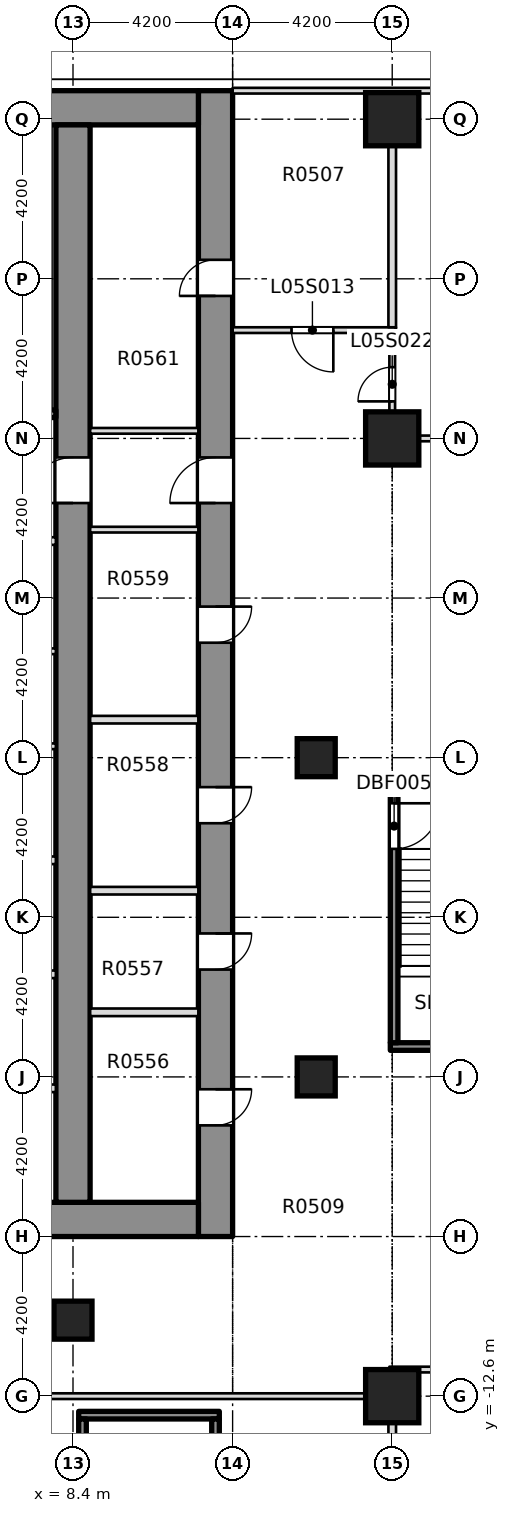
"""IFC4 building model, lengths in metres.
Left out: names, types, materials, properties, quantities, classifications, styles, units other than length and angle.
Written with IfcOpenShell. Run it as: python <this file> out.ifc"""

import sys

from ifc_helpers import new_model, si_unit, direction, frame, frame_2d, origin, origin_2d, place, context, subcontext, project, spatial, rectangle, extrude, element, fill, save


model = new_model("IFC4")
c1 = context("Model", 3, precision=1e-05, world=origin(), true_north=direction((0.0, 1.0)))
c2 = subcontext(c1, "Body", "Model", "MODEL_VIEW")
j1 = project(units=[si_unit("LENGTHUNIT", "METRE"), si_unit("PLANEANGLEUNIT", "RADIAN")], contexts=[c1])
p1 = place(None, origin())
s1 = spatial("IfcSite", under=j1, at=p1, CompositionType="ELEMENT")
p2 = place(p1, origin())
s2 = spatial("IfcBuilding", under=s1, at=p2, CompositionType="ELEMENT")
p3 = place(p2, frame((0.0, 0.0, 30.0)))
s3 = spatial("IfcBuildingStorey", under=s2, at=p3, CompositionType="ELEMENT", Elevation=30.0)
p4 = place(p3, frame((12.15, -8.4, -0.4), z_axis=(0.0, 0.0, 1.0), x_axis=(0.0, 1.0, 0.0)))
e1 = element("IfcWall", 1, at=p4, inside=s3, PredefinedType="SHEAR", context=c2, shape_type="SweptSolid", body=[
    extrude(rectangle(XDim=30.15, YDim=0.9, at=frame_2d((15.075, 0.0))), origin(), (0.0, 0.0, 1.0), 4.58),
])
p5 = place(p4, frame((2.925, 0.0, 0.4)))
e2 = element("IfcOpeningElement", 2, at=p5, cuts=e1, PredefinedType="OPENING", context=c2, shape_type="SweptSolid", body=[
    extrude(rectangle(XDim=0.95, YDim=2.1, at=frame_2d((0.475, 1.05))), frame((0.0, 0.46, 0.0), z_axis=(0.0, -1.0, 0.0), x_axis=(1.0, 0.0, 0.0)), (0.0, 0.0, 1.0), 0.92),
])
p6 = place(p4, frame((7.025, 0.0, 0.4)))
e3 = element("IfcOpeningElement", 3, at=p6, cuts=e1, PredefinedType="OPENING", context=c2, shape_type="SweptSolid", body=[
    extrude(rectangle(XDim=0.95, YDim=2.1, at=frame_2d((0.475, 1.05))), frame((0.0, 0.46, 0.0), z_axis=(0.0, -1.0, 0.0), x_axis=(1.0, 0.0, 0.0)), (0.0, 0.0, 1.0), 0.92),
])
p7 = place(p4, frame((10.875, 0.0, 0.4)))
e4 = element("IfcOpeningElement", 4, at=p7, cuts=e1, PredefinedType="OPENING", context=c2, shape_type="SweptSolid", body=[
    extrude(rectangle(XDim=0.95, YDim=2.1, at=frame_2d((0.475, 1.05))), frame((0.0, 0.46, 0.0), z_axis=(0.0, -1.0, 0.0), x_axis=(1.0, 0.0, 0.0)), (0.0, 0.0, 1.0), 0.92),
])
p8 = place(p4, frame((15.625, 0.0, 0.4)))
e5 = element("IfcOpeningElement", 5, at=p8, cuts=e1, PredefinedType="OPENING", context=c2, shape_type="SweptSolid", body=[
    extrude(rectangle(XDim=0.95, YDim=2.1, at=frame_2d((0.475, 1.05))), frame((0.0, 0.46, 0.0), z_axis=(0.0, -1.0, 0.0), x_axis=(1.0, 0.0, 0.0)), (0.0, 0.0, 1.0), 0.92),
])
p9 = place(p4, frame((24.75, 0.0, 0.4)))
e6 = element("IfcOpeningElement", 6, at=p9, cuts=e1, PredefinedType="OPENING", context=c2, shape_type="SweptSolid", body=[
    extrude(rectangle(XDim=0.95, YDim=2.1, at=frame_2d((0.475, 1.05))), frame((0.0, 0.46, 0.0), z_axis=(0.0, -1.0, 0.0), x_axis=(1.0, 0.0, 0.0)), (0.0, 0.0, 1.0), 0.92),
])
p10 = place(p4, frame((19.3, 0.0, 0.4)))
e7 = element("IfcOpeningElement", 7, at=p10, cuts=e1, PredefinedType="OPENING", context=c2, shape_type="SweptSolid", body=[
    extrude(rectangle(XDim=1.2, YDim=2.1, at=frame_2d((0.6, 1.05))), frame((0.0, 0.46, 0.0), z_axis=(0.0, -1.0, 0.0), x_axis=(1.0, 0.0, 0.0)), (0.0, 0.0, 1.0), 0.92),
])
p11 = place(p3, frame((-11.7, -7.95, -0.4), z_axis=(0.0, 0.0, 1.0), x_axis=(1.0, 0.0, 0.0)))
e8 = element("IfcWall", 8, at=p11, inside=s3, PredefinedType="SHEAR", context=c2, shape_type="SweptSolid", body=[
    extrude(rectangle(XDim=23.4, YDim=0.9, at=frame_2d((11.7, 0.0))), origin(), (0.0, 0.0, 1.0), 4.58),
])
p12 = place(p11, frame((6.95, 0.0, 0.4)))
e9 = element("IfcOpeningElement", 9, at=p12, cuts=e8, PredefinedType="OPENING", context=c2, shape_type="SweptSolid", body=[
    extrude(rectangle(XDim=1.8, YDim=2.1, at=frame_2d((0.9, 1.05))), frame((0.0, 0.46, 0.0), z_axis=(0.0, -1.0, 0.0), x_axis=(1.0, 0.0, 0.0)), (0.0, 0.0, 1.0), 0.92),
])
p13 = place(p11, frame((14.65, 0.0, 0.4)))
e10 = element("IfcOpeningElement", 10, at=p13, cuts=e8, PredefinedType="OPENING", context=c2, shape_type="SweptSolid", body=[
    extrude(rectangle(XDim=1.8, YDim=2.1, at=frame_2d((0.9, 1.05))), frame((0.0, 0.46, 0.0), z_axis=(0.0, -1.0, 0.0), x_axis=(1.0, 0.0, 0.0)), (0.0, 0.0, 1.0), 0.92),
])
p14 = place(p3, frame((-11.7, 21.3, -0.4), z_axis=(0.0, 0.0, 1.0), x_axis=(1.0, 0.0, 0.0)))
e11 = element("IfcWall", 11, at=p14, inside=s3, PredefinedType="SOLIDWALL", context=c2, shape_type="SweptSolid", body=[
    extrude(rectangle(XDim=23.4, YDim=0.9, at=frame_2d((11.7, 0.0))), origin(), (0.0, 0.0, 1.0), 4.58),
])
p15 = place(p3, frame((8.4, -7.5, -0.4), z_axis=(0.0, 0.0, 1.0), x_axis=(0.0, 1.0, 0.0)))
e12 = element("IfcWall", 12, at=p15, inside=s3, PredefinedType="SHEAR", context=c2, shape_type="SweptSolid", body=[
    extrude(rectangle(XDim=28.35, YDim=0.9, at=frame_2d((14.175, 0.0))), origin(), (0.0, 0.0, 1.0), 4.58),
])
p16 = place(p15, frame((18.4, 0.0, 0.4)))
e13 = element("IfcOpeningElement", 13, at=p16, cuts=e12, PredefinedType="OPENING", context=c2, shape_type="SweptSolid", body=[
    extrude(rectangle(XDim=1.2, YDim=2.1, at=frame_2d((0.6, 1.05))), frame((0.0, 0.46, 0.0), z_axis=(0.0, -1.0, 0.0), x_axis=(1.0, 0.0, 0.0)), (0.0, 0.0, 1.0), 0.92),
])
for number, where, z_axis, x_axis in (
    (14, (16.8, -12.6, -0.4), (0.0, 0.0, 1.0), (1.0, 0.0, 0.0)),
    (15, (16.8, 12.6, -0.4), (0.0, 0.0, 1.0), (1.0, 0.0, 0.0)),
    (16, (16.8, 21.0, -0.4), (0.0, 0.0, 1.0), (1.0, 0.0, 0.0)),
):
    element("IfcColumn", number, at=place(p3, frame(where, z_axis=z_axis, x_axis=x_axis)), inside=s3, PredefinedType="COLUMN", context=c2, shape_type="SweptSolid", body=[
        extrude(rectangle(XDim=1.4, YDim=1.4, at=origin_2d()), origin(), (0.0, 0.0, 1.0), 4.58),
    ])
for number, where, z_axis, x_axis in (
    (17, (8.4, -10.6, -0.4), (0.0, 0.0, 1.0), (1.0, 0.0, 0.0)),
    (18, (14.8, -4.2, -0.4), (0.0, 0.0, 1.0), (1.0, 0.0, 0.0)),
    (19, (14.8, 4.2, -0.4), (0.0, 0.0, 1.0), (1.0, 0.0, 0.0)),
):
    element("IfcColumn", number, at=place(p3, frame(where, z_axis=z_axis, x_axis=x_axis)), inside=s3, PredefinedType="COLUMN", context=c2, shape_type="SweptSolid", body=[
        extrude(rectangle(XDim=1.0, YDim=1.0, at=origin_2d()), origin(), (0.0, 0.0, 1.0), 4.58),
    ])
p17 = place(p3, frame((7.275, -12.6, 0.0), z_axis=(0.0, 0.0, 1.0), x_axis=(1.0, 0.0, 0.0)))
e20 = element("IfcWall", 20, at=p17, inside=s3, PredefinedType="PARTITIONING", context=c2, shape_type="SweptSolid", body=[
    extrude(rectangle(XDim=9.625, YDim=0.15, at=frame_2d((4.812, 0.0))), origin(), (0.0, 0.0, 1.0), 4.18),
])
p18 = place(p3, frame((16.725, -11.9, 0.0), z_axis=(0.0, 0.0, 1.0), x_axis=(1.0, 0.0, 0.0)))
e21 = element("IfcWall", 21, at=p18, inside=s3, PredefinedType="PARTITIONING", context=c2, shape_type="SweptSolid", body=[
    extrude(rectangle(XDim=8.575, YDim=0.15, at=frame_2d((4.288, 0.0))), origin(), (0.0, 0.0, 1.0), 4.18),
])
p19 = place(p3, frame((16.725, 12.6, 0.0), z_axis=(0.0, 0.0, 1.0), x_axis=(1.0, 0.0, 0.0)))
e22 = element("IfcWall", 22, at=p19, inside=s3, PredefinedType="PARTITIONING", context=c2, shape_type="SweptSolid", body=[
    extrude(rectangle(XDim=8.55, YDim=0.15, at=frame_2d((4.275, 0.0))), origin(), (0.0, 0.0, 1.0), 4.18),
])
p20 = place(p3, frame((12.601, 15.45, 0.0), z_axis=(0.0, 0.0, 1.0), x_axis=(1.0, 0.0, 0.0)))
e23 = element("IfcWall", 23, at=p20, inside=s3, PredefinedType="PARTITIONING", context=c2, shape_type="SweptSolid", body=[
    extrude(rectangle(XDim=4.299, YDim=0.15, at=frame_2d((2.149, 0.0))), origin(), (0.0, 0.0, 1.0), 4.18),
])
p21 = place(p20, frame((1.549, 0.0, 0.0)))
e24 = element("IfcOpeningElement", 24, at=p21, cuts=e23, PredefinedType="OPENING", context=c2, shape_type="SweptSolid", body=[
    extrude(rectangle(XDim=1.1, YDim=2.1, at=frame_2d((0.55, 1.05))), frame((0.0, 0.085, 0.0), z_axis=(0.0, -1.0, 0.0), x_axis=(1.0, 0.0, 0.0)), (0.0, 0.0, 1.0), 0.17),
])
p22 = place(p3, frame((12.601, 21.75, 0.0), z_axis=(0.0, 0.0, 1.0), x_axis=(1.0, 0.0, 0.0)))
e25 = element("IfcWall", 25, at=p22, inside=s3, PredefinedType="PARTITIONING", context=c2, shape_type="SweptSolid", body=[
    extrude(rectangle(XDim=21.074, YDim=0.15, at=frame_2d((10.537, 0.0))), origin(), (0.0, 0.0, 1.0), 4.18),
])
p23 = place(p22, frame((15.374, 0.0, 0.0)))
e26 = element("IfcOpeningElement", 26, at=p23, cuts=e25, PredefinedType="OPENING", context=c2, shape_type="SweptSolid", body=[
    extrude(rectangle(XDim=1.2, YDim=2.1, at=frame_2d((0.6, 1.05))), frame((0.0, 0.085, 0.0), z_axis=(0.0, -1.0, 0.0), x_axis=(1.0, 0.0, 0.0)), (0.0, 0.0, 1.0), 0.17),
])
p24 = place(p3, frame((16.8, -18.125, 0.0), z_axis=(0.0, 0.0, 1.0), x_axis=(0.0, 1.0, 0.0)))
e27 = element("IfcWall", 27, at=p24, inside=s3, PredefinedType="PARTITIONING", context=c2, shape_type="SweptSolid", body=[
    extrude(rectangle(XDim=5.45, YDim=0.2, at=frame_2d((2.725, 0.0))), origin(), (0.0, 0.0, 1.0), 4.18),
])
p25 = place(p3, frame((16.8, -12.525, 0.0), z_axis=(0.0, 0.0, 1.0), x_axis=(0.0, 1.0, 0.0)))
e28 = element("IfcWall", 28, at=p25, inside=s3, PredefinedType="PARTITIONING", context=c2, shape_type="SweptSolid", body=[
    extrude(rectangle(XDim=0.55, YDim=0.15, at=frame_2d((0.275, 0.0))), origin(), (0.0, 0.0, 1.0), 4.18),
])
p26 = place(p3, frame((16.8, 12.675, 0.0), z_axis=(0.0, 0.0, 1.0), x_axis=(0.0, 1.0, 0.0)))
e29 = element("IfcWall", 29, at=p26, inside=s3, PredefinedType="PARTITIONING", context=c2, shape_type="SweptSolid", body=[
    extrude(rectangle(XDim=2.7, YDim=0.15, at=frame_2d((1.35, 0.0))), origin(), (0.0, 0.0, 1.0), 4.18),
])
p27 = place(p26, frame((0.9, 0.0, 0.0)))
e30 = element("IfcOpeningElement", 30, at=p27, cuts=e29, PredefinedType="OPENING", context=c2, shape_type="SweptSolid", body=[
    extrude(rectangle(XDim=0.9, YDim=2.1, at=frame_2d((0.45, 1.05))), frame((0.0, 0.085, 0.0), z_axis=(0.0, -1.0, 0.0), x_axis=(1.0, 0.0, 0.0)), (0.0, 0.0, 1.0), 0.17),
])
p28 = place(p3, frame((16.8, 15.525, 0.0), z_axis=(0.0, 0.0, 1.0), x_axis=(0.0, 1.0, 0.0)))
e31 = element("IfcWall", 31, at=p28, inside=s3, PredefinedType="PARTITIONING", context=c2, shape_type="SweptSolid", body=[
    extrude(rectangle(XDim=6.15, YDim=0.2, at=frame_2d((3.075, 0.0))), origin(), (0.0, 0.0, 1.0), 4.18),
])
for number, where, z_axis, x_axis in (
    (32, (5.575, -4.5, 0.0), (0.0, 0.0, 1.0), (1.0, 0.0, 0.0)),
    (33, (5.575, -1.5, 0.0), (0.0, 0.0, 1.0), (1.0, 0.0, 0.0)),
    (34, (5.575, 1.5, 0.0), (0.0, 0.0, 1.0), (1.0, 0.0, 0.0)),
):
    element("IfcWall", number, at=place(p3, frame(where, z_axis=z_axis, x_axis=x_axis)), inside=s3, PredefinedType="PARTITIONING", context=c2, shape_type="SweptSolid", body=[
        extrude(rectangle(XDim=2.374, YDim=0.2, at=frame_2d((1.187, 0.0))), origin(), (0.0, 0.0, 1.0), 4.18),
    ])
p29 = place(p3, frame((5.425, 4.5, 0.0), z_axis=(0.0, 0.0, 1.0), x_axis=(1.0, 0.0, 0.0)))
e35 = element("IfcWall", 35, at=p29, inside=s3, PredefinedType="PARTITIONING", context=c2, shape_type="SweptSolid", body=[
    extrude(rectangle(XDim=2.524, YDim=0.15, at=frame_2d((1.262, 0.0))), origin(), (0.0, 0.0, 1.0), 4.18),
])
p30 = place(p3, frame((-7.949, 7.0, 0.0), z_axis=(0.0, 0.0, 1.0), x_axis=(1.0, 0.0, 0.0)))
e36 = element("IfcWall", 36, at=p30, inside=s3, PredefinedType="PARTITIONING", context=c2, shape_type="SweptSolid", body=[
    extrude(rectangle(XDim=15.898, YDim=0.15, at=frame_2d((7.949, 0.0))), origin(), (0.0, 0.0, 1.0), 4.18),
])
p31 = place(p30, frame((7.249, 0.0, 0.0)))
e37 = element("IfcOpeningElement", 37, at=p31, cuts=e36, PredefinedType="OPENING", context=c2, shape_type="SweptSolid", body=[
    extrude(rectangle(XDim=1.4, YDim=2.1, at=frame_2d((0.7, 1.05))), frame((0.0, 0.085, 0.0), z_axis=(0.0, -1.0, 0.0), x_axis=(1.0, 0.0, 0.0)), (0.0, 0.0, 1.0), 0.17),
])
p32 = place(p3, frame((3.6, 9.9, 0.0), z_axis=(0.0, 0.0, 1.0), x_axis=(1.0, 0.0, 0.0)))
e38 = element("IfcWall", 38, at=p32, inside=s3, PredefinedType="PARTITIONING", context=c2, shape_type="SweptSolid", body=[
    extrude(rectangle(XDim=4.349, YDim=0.2, at=frame_2d((2.174, 0.0))), origin(), (0.0, 0.0, 1.0), 4.18),
])
p33 = place(p32, frame((2.25, 0.0, 0.0)))
e39 = element("IfcOpeningElement", 39, at=p33, cuts=e38, PredefinedType="OPENING", context=c2, shape_type="SweptSolid", body=[
    extrude(rectangle(XDim=1.1, YDim=2.1, at=frame_2d((0.55, 1.05))), frame((0.0, 0.11, 0.0), z_axis=(0.0, -1.0, 0.0), x_axis=(1.0, 0.0, 0.0)), (0.0, 0.0, 1.0), 0.22),
])
p34 = place(p3, frame((3.425, 13.25, 0.0), z_axis=(0.0, 0.0, 1.0), x_axis=(1.0, 0.0, 0.0)))
e40 = element("IfcWall", 40, at=p34, inside=s3, PredefinedType="SOLIDWALL", context=c2, shape_type="SweptSolid", body=[
    extrude(rectangle(XDim=4.524, YDim=0.2, at=frame_2d((2.262, 0.0))), origin(), (0.0, 0.0, 1.0), 4.18),
])
p35 = place(p34, frame((1.825, 0.0, 0.0)))
e41 = element("IfcOpeningElement", 41, at=p35, cuts=e40, PredefinedType="OPENING", context=c2, shape_type="SweptSolid", body=[
    extrude(rectangle(XDim=1.2, YDim=2.1, at=frame_2d((0.6, 1.05))), frame((0.0, 0.11, 0.0), z_axis=(0.0, -1.0, 0.0), x_axis=(1.0, 0.0, 0.0)), (0.0, 0.0, 1.0), 0.22),
])
for number, where, z_axis, x_axis in (
    (42, (8.851, -2.5, 0.0), (0.0, 0.0, 1.0), (1.0, 0.0, 0.0)),
    (43, (8.851, 0.7, 0.0), (0.0, 0.0, 1.0), (1.0, 0.0, 0.0)),
    (44, (8.851, 5.2, 0.0), (0.0, 0.0, 1.0), (1.0, 0.0, 0.0)),
):
    element("IfcWall", number, at=place(p3, frame(where, z_axis=z_axis, x_axis=x_axis)), inside=s3, PredefinedType="PARTITIONING", context=c2, shape_type="SweptSolid", body=[
        extrude(rectangle(XDim=2.848, YDim=0.2, at=frame_2d((1.424, 0.0))), origin(), (0.0, 0.0, 1.0), 4.18),
    ])
for number, where, z_axis, x_axis in (
    (45, (8.851, 10.2, 0.0), (0.0, 0.0, 1.0), (1.0, 0.0, 0.0)),
    (46, (8.851, 12.8, 0.0), (0.0, 0.0, 1.0), (1.0, 0.0, 0.0)),
):
    element("IfcWall", number, at=place(p3, frame(where, z_axis=z_axis, x_axis=x_axis)), inside=s3, PredefinedType="PARTITIONING", context=c2, shape_type="SweptSolid", body=[
        extrude(rectangle(XDim=2.848, YDim=0.15, at=frame_2d((1.424, 0.0))), origin(), (0.0, 0.0, 1.0), 4.18),
    ])
p36 = place(p3, frame((8.55, -13.1, 0.0), z_axis=(0.0, 0.0, 1.0), x_axis=(1.0, 0.0, 0.0)))
e47 = element("IfcWall", 47, at=p36, inside=s3, PredefinedType="SOLIDWALL", context=c2, shape_type="SweptSolid", body=[
    extrude(rectangle(XDim=3.7, YDim=0.2, at=frame_2d((1.85, 0.0))), origin(), (0.0, 0.0, 1.0), 4.18),
])
p37 = place(p3, frame((8.65, -20.3, 0.0), z_axis=(0.0, 0.0, 1.0), x_axis=(0.0, 1.0, 0.0)))
e48 = element("IfcWall", 48, at=p37, inside=s3, PredefinedType="SOLIDWALL", context=c2, shape_type="SweptSolid", body=[
    extrude(rectangle(XDim=7.1, YDim=0.2, at=frame_2d((3.55, 0.0))), origin(), (0.0, 0.0, 1.0), 4.18),
])
p38 = place(p3, frame((12.15, -19.8, 0.0), z_axis=(0.0, 0.0, 1.0), x_axis=(0.0, 1.0, 0.0)))
e49 = element("IfcWall", 49, at=p38, inside=s3, PredefinedType="SOLIDWALL", context=c2, shape_type="SweptSolid", body=[
    extrude(rectangle(XDim=6.6, YDim=0.2, at=frame_2d((3.3, 0.0))), origin(), (0.0, 0.0, 1.0), 4.18),
])
for number, where, z_axis, x_axis in (
    (50, (16.75, -3.4, 0.0), (0.0, 0.0, 1.0), (1.0, 0.0, 0.0)),
    (51, (16.75, 3.4, 0.0), (0.0, 0.0, 1.0), (1.0, 0.0, 0.0)),
):
    element("IfcWall", number, at=place(p3, frame(where, z_axis=z_axis, x_axis=x_axis)), inside=s3, PredefinedType="SOLIDWALL", context=c2, shape_type="SweptSolid", body=[
        extrude(rectangle(XDim=3.7, YDim=0.2, at=frame_2d((1.85, 0.0))), origin(), (0.0, 0.0, 1.0), 4.18),
    ])
p39 = place(p3, frame((16.85, -3.3, 0.0), z_axis=(0.0, 0.0, 1.0), x_axis=(0.0, 1.0, 0.0)))
e52 = element("IfcWall", 52, at=p39, inside=s3, PredefinedType="SOLIDWALL", context=c2, shape_type="SweptSolid", body=[
    extrude(rectangle(XDim=6.6, YDim=0.2, at=frame_2d((3.3, 0.0))), origin(), (0.0, 0.0, 1.0), 4.18),
])
p40 = place(p39, frame((5.1, 0.0, 0.0)))
e53 = element("IfcOpeningElement", 53, at=p40, cuts=e52, PredefinedType="OPENING", context=c2, shape_type="SweptSolid", body=[
    extrude(rectangle(XDim=1.2, YDim=2.1, at=frame_2d((0.6, 1.05))), frame((0.0, 0.11, 0.0), z_axis=(0.0, -1.0, 0.0), x_axis=(1.0, 0.0, 0.0)), (0.0, 0.0, 1.0), 0.22),
])
p41 = place(p21, origin())
e54 = element("IfcDoor", 54, at=p41, inside=s3, OperationType="SINGLE_SWING_LEFT", PredefinedType="DOOR", context=c2, shape_type="SweptSolid", body=[
    extrude(rectangle(XDim=1.1, YDim=2.1, at=frame_2d((0.55, 1.05))), frame((0.0, 0.025, 0.0), z_axis=(0.0, -1.0, 0.0), x_axis=(1.0, 0.0, 0.0)), (0.0, 0.0, 1.0), 0.05),
])
fill(e24, e54)
p42 = place(p27, origin())
e55 = element("IfcDoor", 55, at=p42, inside=s3, OperationType="SINGLE_SWING_RIGHT", PredefinedType="DOOR", context=c2, shape_type="SweptSolid", body=[
    extrude(rectangle(XDim=0.9, YDim=2.1, at=frame_2d((0.45, 1.05))), frame((0.0, 0.025, 0.0), z_axis=(0.0, -1.0, 0.0), x_axis=(1.0, 0.0, 0.0)), (0.0, 0.0, 1.0), 0.05),
])
fill(e30, e55)
p43 = place(p5, origin())
e56 = element("IfcDoor", 56, at=p43, inside=s3, OperationType="SINGLE_SWING_LEFT", PredefinedType="DOOR", context=c2, shape_type="SweptSolid", body=[
    extrude(rectangle(XDim=0.95, YDim=2.1, at=frame_2d((0.475, 1.05))), frame((0.0, 0.025, 0.0), z_axis=(0.0, -1.0, 0.0), x_axis=(1.0, 0.0, 0.0)), (0.0, 0.0, 1.0), 0.05),
])
fill(e2, e56)
p44 = place(p6, origin())
e57 = element("IfcDoor", 57, at=p44, inside=s3, OperationType="SINGLE_SWING_LEFT", PredefinedType="DOOR", context=c2, shape_type="SweptSolid", body=[
    extrude(rectangle(XDim=0.95, YDim=2.1, at=frame_2d((0.475, 1.05))), frame((0.0, 0.025, 0.0), z_axis=(0.0, -1.0, 0.0), x_axis=(1.0, 0.0, 0.0)), (0.0, 0.0, 1.0), 0.05),
])
fill(e3, e57)
p45 = place(p7, origin())
e58 = element("IfcDoor", 58, at=p45, inside=s3, OperationType="SINGLE_SWING_LEFT", PredefinedType="DOOR", context=c2, shape_type="SweptSolid", body=[
    extrude(rectangle(XDim=0.95, YDim=2.1, at=frame_2d((0.475, 1.05))), frame((0.0, 0.025, 0.0), z_axis=(0.0, -1.0, 0.0), x_axis=(1.0, 0.0, 0.0)), (0.0, 0.0, 1.0), 0.05),
])
fill(e4, e58)
p46 = place(p8, origin())
e59 = element("IfcDoor", 59, at=p46, inside=s3, OperationType="SINGLE_SWING_LEFT", PredefinedType="DOOR", context=c2, shape_type="SweptSolid", body=[
    extrude(rectangle(XDim=0.95, YDim=2.1, at=frame_2d((0.475, 1.05))), frame((0.0, 0.025, 0.0), z_axis=(0.0, -1.0, 0.0), x_axis=(1.0, 0.0, 0.0)), (0.0, 0.0, 1.0), 0.05),
])
fill(e5, e59)
p47 = place(p9, origin())
e60 = element("IfcDoor", 60, at=p47, inside=s3, OperationType="SINGLE_SWING_LEFT", PredefinedType="DOOR", context=c2, shape_type="SweptSolid", body=[
    extrude(rectangle(XDim=0.95, YDim=2.1, at=frame_2d((0.475, 1.05))), frame((0.0, 0.025, 0.0), z_axis=(0.0, -1.0, 0.0), x_axis=(1.0, 0.0, 0.0)), (0.0, 0.0, 1.0), 0.05),
])
fill(e6, e60)
p48 = place(p10, origin())
e61 = element("IfcDoor", 61, at=p48, inside=s3, OperationType="SINGLE_SWING_LEFT", PredefinedType="DOOR", context=c2, shape_type="SweptSolid", body=[
    extrude(rectangle(XDim=1.2, YDim=2.1, at=frame_2d((0.6, 1.05))), frame((0.0, 0.025, 0.0), z_axis=(0.0, -1.0, 0.0), x_axis=(1.0, 0.0, 0.0)), (0.0, 0.0, 1.0), 0.05),
])
fill(e7, e61)
p49 = place(p16, origin())
e62 = element("IfcDoor", 62, at=p49, inside=s3, OperationType="SINGLE_SWING_LEFT", PredefinedType="DOOR", context=c2, shape_type="SweptSolid", body=[
    extrude(rectangle(XDim=1.2, YDim=2.1, at=frame_2d((0.6, 1.05))), frame((0.0, 0.025, 0.0), z_axis=(0.0, -1.0, 0.0), x_axis=(1.0, 0.0, 0.0)), (0.0, 0.0, 1.0), 0.05),
])
fill(e13, e62)
p50 = place(p40, origin())
e63 = element("IfcDoor", 63, at=p50, inside=s3, OperationType="SINGLE_SWING_LEFT", PredefinedType="DOOR", context=c2, shape_type="SweptSolid", body=[
    extrude(rectangle(XDim=1.2, YDim=2.1, at=frame_2d((0.6, 1.05))), frame((0.0, 0.025, 0.0), z_axis=(0.0, -1.0, 0.0), x_axis=(1.0, 0.0, 0.0)), (0.0, 0.0, 1.0), 0.05),
])
fill(e53, e63)
save(model, sys.argv[1])
